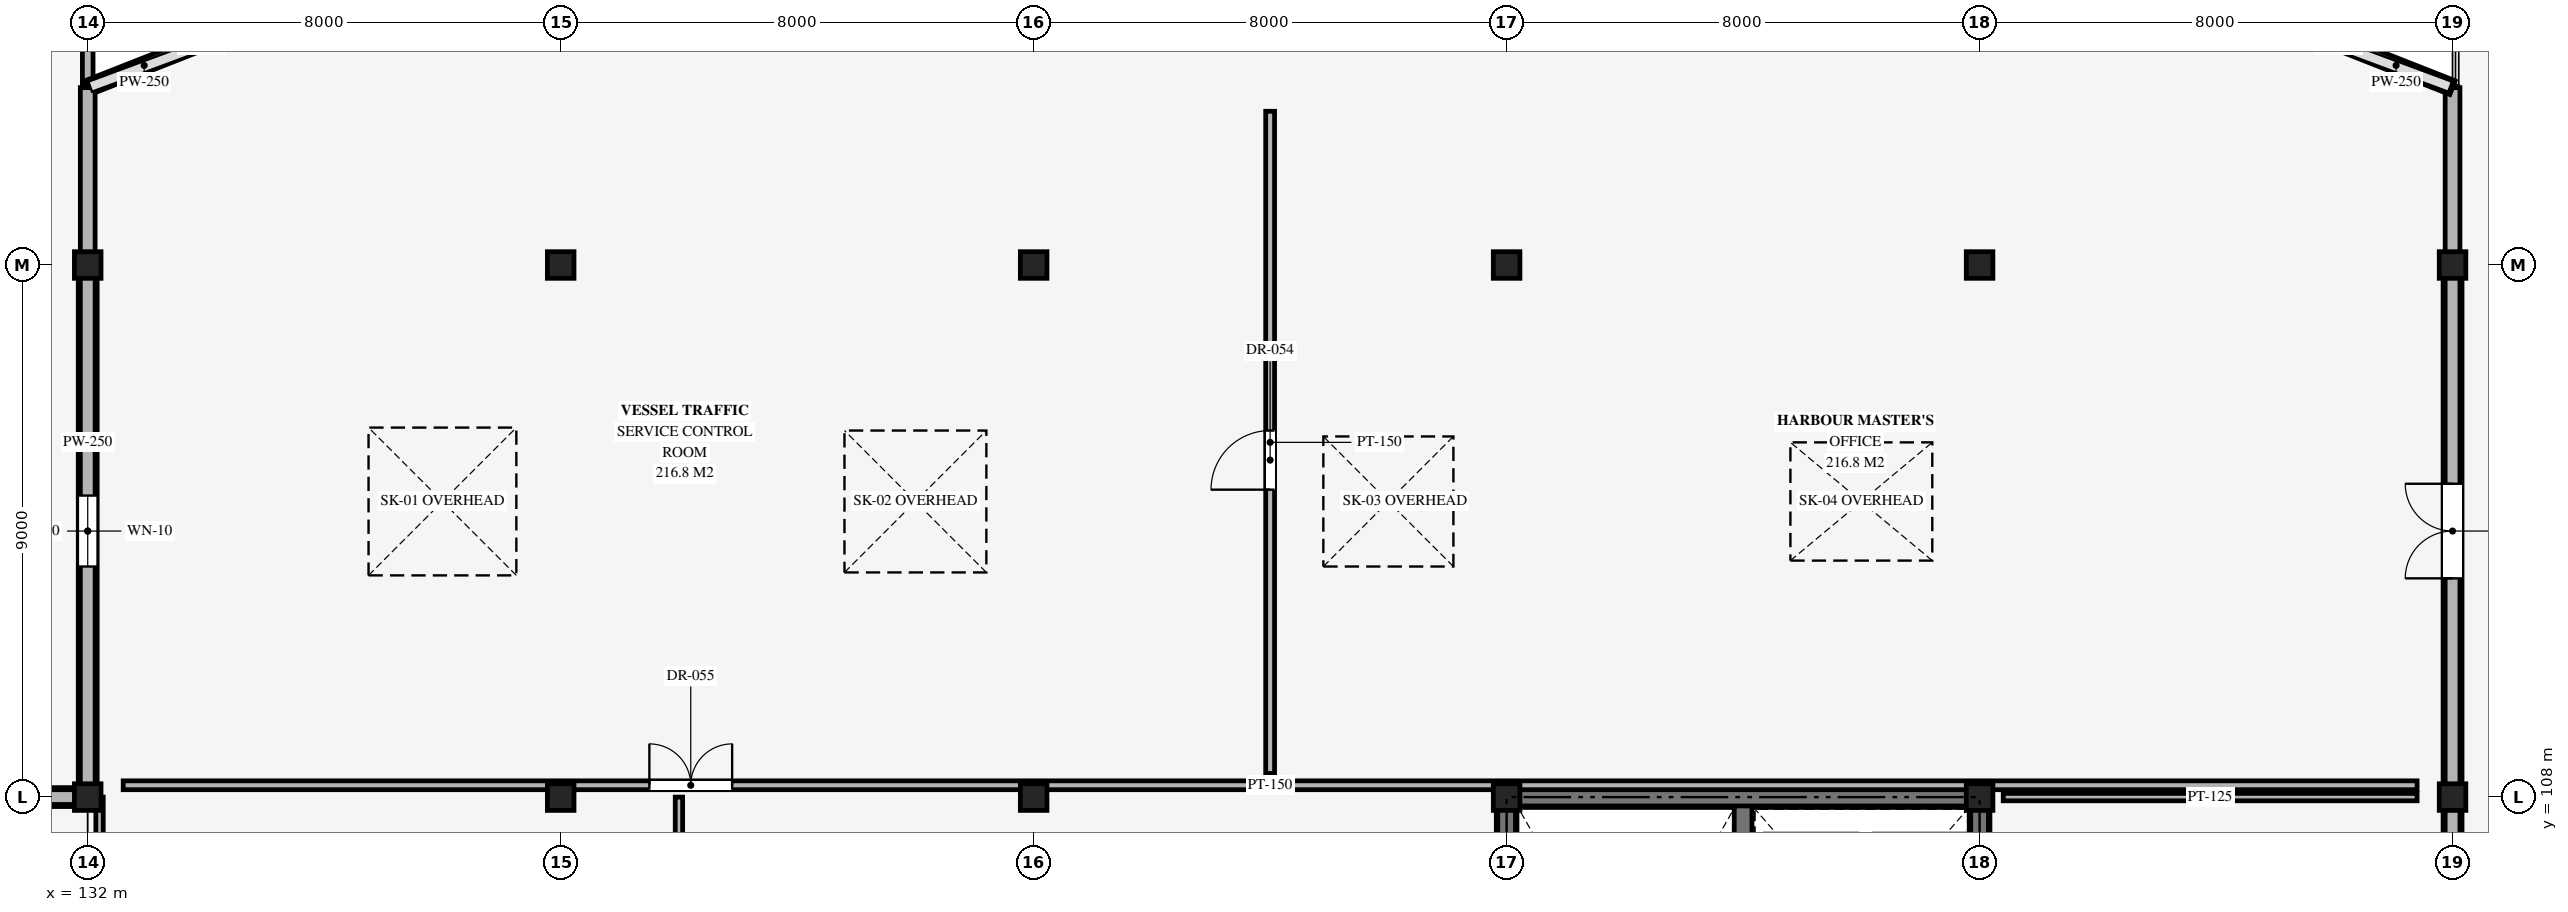
"""IFC4 building model, lengths in metres.
Left out: names, types, materials, properties, quantities, classifications, styles, units other than length and angle.
Written with IfcOpenShell. Run it as: python <this file> out.ifc"""

import sys

from ifc_helpers import new_model, si_unit, direction, frame, frame_2d, origin, origin_2d, place, context, subcontext, project, spatial, rectangle, extrude, element, fill, save


model = new_model("IFC4")
c1 = context("Model", 3, precision=1e-05, world=origin(), true_north=direction((0.0, 1.0)))
c2 = subcontext(c1, "Body", "Model", "MODEL_VIEW")
j1 = project(units=[si_unit("LENGTHUNIT", "METRE"), si_unit("PLANEANGLEUNIT", "RADIAN")], contexts=[c1])
p1 = place(None, origin())
s1 = spatial("IfcSite", under=j1, at=p1, CompositionType="ELEMENT")
p2 = place(p1, origin())
s2 = spatial("IfcBuilding", under=s1, at=p2, CompositionType="ELEMENT")
p3 = place(p2, frame((0.0, 0.0, 23.7)))
s3 = spatial("IfcBuildingStorey", under=s2, at=p3, CompositionType="ELEMENT", Elevation=23.7)
for number, where, z_axis, x_axis in (
    (1, (132.0, 108.0, 0.0), (0.0, 0.0, 1.0), (1.0, 0.0, 0.0)),
    (2, (132.0, 117.0, 0.0), (0.0, 0.0, 1.0), (1.0, 0.0, 0.0)),
    (3, (140.0, 108.0, 0.0), (0.0, 0.0, 1.0), (1.0, 0.0, 0.0)),
    (4, (140.0, 117.0, 0.0), (0.0, 0.0, 1.0), (1.0, 0.0, 0.0)),
    (5, (148.0, 108.0, 0.0), (0.0, 0.0, 1.0), (1.0, 0.0, 0.0)),
    (6, (148.0, 117.0, 0.0), (0.0, 0.0, 1.0), (1.0, 0.0, 0.0)),
    (7, (156.0, 108.0, 0.0), (0.0, 0.0, 1.0), (1.0, 0.0, 0.0)),
    (8, (156.0, 117.0, 0.0), (0.0, 0.0, 1.0), (1.0, 0.0, 0.0)),
    (9, (164.0, 108.0, 0.0), (0.0, 0.0, 1.0), (1.0, 0.0, 0.0)),
    (10, (164.0, 117.0, 0.0), (0.0, 0.0, 1.0), (1.0, 0.0, 0.0)),
    (11, (172.0, 108.0, 0.0), (0.0, 0.0, 1.0), (1.0, 0.0, 0.0)),
    (12, (172.0, 117.0, 0.0), (0.0, 0.0, 1.0), (1.0, 0.0, 0.0)),
):
    element("IfcColumn", number, at=place(p3, frame(where, z_axis=z_axis, x_axis=x_axis)), inside=s3, PredefinedType="COLUMN", context=c2, shape_type="SweptSolid", body=[
        extrude(rectangle(XDim=0.45, YDim=0.45, at=origin_2d()), origin(), (0.0, 0.0, 1.0), 4.04),
    ])
p4 = place(p3, frame((172.0, 99.225, 0.0), z_axis=(0.0, 0.0, 1.0), x_axis=(0.0, 1.0, 0.0)))
e13 = element("IfcWall", 13, at=p4, inside=s3, PredefinedType="SOLIDWALL", context=c2, shape_type="SweptSolid", body=[
    extrude(rectangle(XDim=8.55, YDim=0.32, at=frame_2d((4.275, 0.0))), origin(), (0.0, 0.0, 1.0), 3.98),
])
p5 = place(p4, frame((3.475, 0.0, 0.0)))
e14 = element("IfcOpeningElement", 14, at=p5, cuts=e13, PredefinedType="OPENING", context=c2, shape_type="SweptSolid", body=[
    extrude(rectangle(XDim=1.6, YDim=2.2, at=frame_2d((0.8, 1.1))), frame((0.0, 0.17, 0.0), z_axis=(0.0, -1.0, 0.0), x_axis=(1.0, 0.0, 0.0)), (0.0, 0.0, 1.0), 0.34),
])
p6 = place(p3, frame((172.0, 108.225, 0.0), z_axis=(0.0, 0.0, 1.0), x_axis=(0.0, 1.0, 0.0)))
e15 = element("IfcWall", 15, at=p6, inside=s3, PredefinedType="SOLIDWALL", context=c2, shape_type="SweptSolid", body=[
    extrude(rectangle(XDim=8.55, YDim=0.32, at=frame_2d((4.275, 0.0))), origin(), (0.0, 0.0, 1.0), 3.98),
])
p7 = place(p6, frame((3.475, 0.0, 0.0)))
e16 = element("IfcOpeningElement", 16, at=p7, cuts=e15, PredefinedType="OPENING", context=c2, shape_type="SweptSolid", body=[
    extrude(rectangle(XDim=1.6, YDim=2.2, at=frame_2d((0.8, 1.1))), frame((0.0, 0.17, 0.0), z_axis=(0.0, -1.0, 0.0), x_axis=(1.0, 0.0, 0.0)), (0.0, 0.0, 1.0), 0.34),
])
p8 = place(p3, frame((132.0, 116.775, 0.0), z_axis=(0.0, 0.0, 1.0), x_axis=(0.0, -1.0, 0.0)))
e17 = element("IfcWall", 17, at=p8, inside=s3, PredefinedType="SOLIDWALL", context=c2, shape_type="SweptSolid", body=[
    extrude(rectangle(XDim=8.55, YDim=0.32, at=frame_2d((4.275, 0.0))), origin(), (0.0, 0.0, 1.0), 3.98),
])
p9 = place(p8, frame((3.675, 0.0, 1.0)))
e18 = element("IfcOpeningElement", 18, at=p9, cuts=e17, PredefinedType="OPENING", context=c2, shape_type="SweptSolid", body=[
    extrude(rectangle(XDim=1.2, YDim=1.8, at=frame_2d((0.6, 0.9))), frame((0.0, 0.17, 0.0), z_axis=(0.0, -1.0, 0.0), x_axis=(1.0, 0.0, 0.0)), (0.0, 0.0, 1.0), 0.34),
])
p10 = place(p3, frame((120.225, 108.0, 0.0), z_axis=(0.0, 0.0, 1.0), x_axis=(1.0, 0.0, 0.0)))
e19 = element("IfcWall", 19, at=p10, inside=s3, PredefinedType="SOLIDWALL", context=c2, shape_type="SweptSolid", body=[
    extrude(rectangle(XDim=11.55, YDim=0.32, at=frame_2d((5.775, 0.0))), origin(), (0.0, 0.0, 1.0), 3.98),
])
p11 = place(p3, frame((132.0, 126.0, 0.0), z_axis=(0.0, 0.0, 1.0), x_axis=(0.0, -1.0, 0.0)))
e20 = element("IfcWall", 20, at=p11, inside=s3, PredefinedType="PARAPET", context=c2, shape_type="SweptSolid", body=[
    extrude(rectangle(XDim=6.0, YDim=0.18, at=frame_2d((3.0, 0.0))), origin(), (0.0, 0.0, 1.0), 1.15),
])
p12 = place(p3, frame((172.0, 90.0, 4.2), z_axis=(0.0, 0.0, 1.0), x_axis=(0.0, 1.0, 0.0)))
e21 = element("IfcWall", 21, at=p12, inside=s3, PredefinedType="PARAPET", context=c2, shape_type="SweptSolid", body=[
    extrude(rectangle(XDim=30.0, YDim=0.25, at=frame_2d((15.0, 0.0))), origin(), (0.0, 0.0, 1.0), 1.35),
])
for number, where, z_axis, x_axis in (
    (22, (172.0, 120.0, 4.2), (0.0, 0.0, 1.0), (-0.93, 0.366, 0.0)),
    (23, (133.91, 120.752, 4.2), (0.0, 0.0, 1.0), (-0.93, -0.366, 0.0)),
):
    element("IfcWall", number, at=place(p3, frame(where, z_axis=z_axis, x_axis=x_axis)), inside=s3, PredefinedType="PARAPET", context=c2, shape_type="SweptSolid", body=[
        extrude(rectangle(XDim=2.052, YDim=0.25, at=frame_2d((1.026, 0.0))), origin(), (0.0, 0.0, 1.0), 1.35),
    ])
p13 = place(p3, frame((132.0, 120.0, 4.2), z_axis=(0.0, 0.0, 1.0), x_axis=(0.0, -1.0, 0.0)))
e24 = element("IfcWall", 24, at=p13, inside=s3, PredefinedType="PARAPET", context=c2, shape_type="SweptSolid", body=[
    extrude(rectangle(XDim=12.0, YDim=0.25, at=frame_2d((6.0, 0.0))), origin(), (0.0, 0.0, 1.0), 1.35),
])
p14 = place(p3, frame((132.0, 108.0, 4.2), z_axis=(0.0, 0.0, 1.0), x_axis=(-1.0, 0.0, 0.0)))
e25 = element("IfcWall", 25, at=p14, inside=s3, PredefinedType="PARAPET", context=c2, shape_type="SweptSolid", body=[
    extrude(rectangle(XDim=24.0, YDim=0.25, at=frame_2d((12.0, 0.0))), origin(), (0.0, 0.0, 1.0), 1.35),
])
p15 = place(p3, frame((156.0, 108.0, 0.0), z_axis=(0.0, 0.0, 1.0), x_axis=(1.0, 0.0, 0.0)))
e26 = element("IfcWall", 26, at=p15, inside=s3, PredefinedType="SHEAR", context=c2, shape_type="SweptSolid", body=[
    extrude(rectangle(XDim=8.0, YDim=0.35, at=frame_2d((4.0, 0.0))), origin(), (0.0, 0.0, 1.0), 3.98),
])
p16 = place(p3, frame((156.0, 99.0, 0.0), z_axis=(0.0, 0.0, 1.0), x_axis=(0.0, 1.0, 0.0)))
e27 = element("IfcWall", 27, at=p16, inside=s3, PredefinedType="SHEAR", context=c2, shape_type="SweptSolid", body=[
    extrude(rectangle(XDim=9.0, YDim=0.35, at=frame_2d((4.5, 0.0))), origin(), (0.0, 0.0, 1.0), 3.98),
])
p17 = place(p3, frame((164.0, 99.0, 0.0), z_axis=(0.0, 0.0, 1.0), x_axis=(0.0, 1.0, 0.0)))
e28 = element("IfcWall", 28, at=p17, inside=s3, PredefinedType="SHEAR", context=c2, shape_type="SweptSolid", body=[
    extrude(rectangle(XDim=9.0, YDim=0.35, at=frame_2d((4.5, 0.0))), origin(), (0.0, 0.0, 1.0), 3.98),
])
p18 = place(p17, frame((1.4, 0.0, 0.0)))
e29 = element("IfcOpeningElement", 29, at=p18, cuts=e28, PredefinedType="OPENING", context=c2, shape_type="SweptSolid", body=[
    extrude(rectangle(XDim=1.5, YDim=2.2, at=frame_2d((0.75, 1.1))), frame((0.0, 0.185, 0.0), z_axis=(0.0, -1.0, 0.0), x_axis=(1.0, 0.0, 0.0)), (0.0, 0.0, 1.0), 0.37),
])
p19 = place(p3, frame((160.0, 108.0, 0.0), z_axis=(0.0, 0.0, 1.0), x_axis=(0.0, -1.0, 0.0)))
e30 = element("IfcWall", 30, at=p19, inside=s3, PredefinedType="SHEAR", context=c2, shape_type="SweptSolid", body=[
    extrude(rectangle(XDim=9.0, YDim=0.3, at=frame_2d((4.5, 0.0))), origin(), (0.0, 0.0, 1.0), 3.98),
])
p20 = place(p19, frame((7.45, 0.0, 0.0)))
e31 = element("IfcOpeningElement", 31, at=p20, cuts=e30, PredefinedType="OPENING", context=c2, shape_type="SweptSolid", body=[
    extrude(rectangle(XDim=1.05, YDim=2.15, at=frame_2d((0.525, 1.075))), frame((0.0, 0.16, 0.0), z_axis=(0.0, -1.0, 0.0), x_axis=(1.0, 0.0, 0.0)), (0.0, 0.0, 1.0), 0.32),
])
p21 = place(p3, frame((156.0, 108.0, 3.98), z_axis=(0.0, 0.0, 1.0), x_axis=(1.0, 0.0, 0.0)))
e32 = element("IfcWall", 32, at=p21, inside=s3, PredefinedType="SHEAR", context=c2, shape_type="SweptSolid", body=[
    extrude(rectangle(XDim=8.0, YDim=0.3, at=frame_2d((4.0, 0.0))), origin(), (0.0, 0.0, 1.0), 1.84),
])
for number, where, z_axis, x_axis in (
    (33, (156.0, 99.0, 3.98), (0.0, 0.0, 1.0), (0.0, 1.0, 0.0)),
    (34, (164.0, 99.0, 3.98), (0.0, 0.0, 1.0), (0.0, 1.0, 0.0)),
):
    element("IfcWall", number, at=place(p3, frame(where, z_axis=z_axis, x_axis=x_axis)), inside=s3, PredefinedType="SHEAR", context=c2, shape_type="SweptSolid", body=[
        extrude(rectangle(XDim=9.0, YDim=0.3, at=frame_2d((4.5, 0.0))), origin(), (0.0, 0.0, 1.0), 1.84),
    ])
p22 = place(p3, frame((152.0, 108.4, 0.0), z_axis=(0.0, 0.0, 1.0), x_axis=(0.0, 1.0, 0.0)))
e35 = element("IfcWall", 35, at=p22, inside=s3, PredefinedType="PARTITIONING", context=c2, shape_type="SweptSolid", body=[
    extrude(rectangle(XDim=11.2, YDim=0.15, at=frame_2d((5.6, 0.0))), origin(), (0.0, 0.0, 1.0), 3.25),
])
p23 = place(p22, frame((4.8, 0.0, 0.0)))
e36 = element("IfcOpeningElement", 36, at=p23, cuts=e35, PredefinedType="OPENING", context=c2, shape_type="SweptSolid", body=[
    extrude(rectangle(XDim=1.0, YDim=2.15, at=frame_2d((0.5, 1.075))), frame((0.0, 0.085, 0.0), z_axis=(0.0, -1.0, 0.0), x_axis=(1.0, 0.0, 0.0)), (0.0, 0.0, 1.0), 0.17),
])
p24 = place(p3, frame((132.6, 108.2, 0.0), z_axis=(0.0, 0.0, 1.0), x_axis=(1.0, 0.0, 0.0)))
e37 = element("IfcWall", 37, at=p24, inside=s3, PredefinedType="PARTITIONING", context=c2, shape_type="SweptSolid", body=[
    extrude(rectangle(XDim=38.8, YDim=0.15, at=frame_2d((19.4, 0.0))), origin(), (0.0, 0.0, 1.0), 3.25),
])
p25 = place(p24, frame((8.9, 0.0, 0.0)))
e38 = element("IfcOpeningElement", 38, at=p25, cuts=e37, PredefinedType="OPENING", context=c2, shape_type="SweptSolid", body=[
    extrude(rectangle(XDim=1.4, YDim=2.15, at=frame_2d((0.7, 1.075))), frame((0.0, 0.085, 0.0), z_axis=(0.0, -1.0, 0.0), x_axis=(1.0, 0.0, 0.0)), (0.0, 0.0, 1.0), 0.17),
])
p26 = place(p3, frame((142.0, 99.4, 0.0), z_axis=(0.0, 0.0, 1.0), x_axis=(0.0, 1.0, 0.0)))
e39 = element("IfcWall", 39, at=p26, inside=s3, PredefinedType="PARTITIONING", context=c2, shape_type="SweptSolid", body=[
    extrude(rectangle(XDim=8.6, YDim=0.125, at=frame_2d((4.3, 0.0))), origin(), (0.0, 0.0, 1.0), 3.25),
])
p27 = place(p26, frame((3.6, 0.0, 0.0)))
e40 = element("IfcOpeningElement", 40, at=p27, cuts=e39, PredefinedType="OPENING", context=c2, shape_type="SweptSolid", body=[
    extrude(rectangle(XDim=0.95, YDim=2.1, at=frame_2d((0.475, 1.05))), frame((0.0, 0.073, 0.0), z_axis=(0.0, -1.0, 0.0), x_axis=(1.0, 0.0, 0.0)), (0.0, 0.0, 1.0), 0.145),
])
p28 = place(p3, frame((132.2, 99.4, 0.0), z_axis=(0.0, 0.0, 1.0), x_axis=(0.0, 1.0, 0.0)))
e41 = element("IfcWall", 41, at=p28, inside=s3, PredefinedType="PARTITIONING", context=c2, shape_type="SweptSolid", body=[
    extrude(rectangle(XDim=8.6, YDim=0.125, at=frame_2d((4.3, 0.0))), origin(), (0.0, 0.0, 1.0), 3.25),
])
p29 = place(p28, frame((3.6, 0.0, 0.0)))
e42 = element("IfcOpeningElement", 42, at=p29, cuts=e41, PredefinedType="OPENING", context=c2, shape_type="SweptSolid", body=[
    extrude(rectangle(XDim=1.05, YDim=2.15, at=frame_2d((0.525, 1.075))), frame((0.0, 0.073, 0.0), z_axis=(0.0, -1.0, 0.0), x_axis=(1.0, 0.0, 0.0)), (0.0, 0.0, 1.0), 0.145),
])
p30 = place(p3, frame((164.4, 108.0, 0.0), z_axis=(0.0, 0.0, 1.0), x_axis=(1.0, 0.0, 0.0)))
e43 = element("IfcWall", 43, at=p30, inside=s3, PredefinedType="PARTITIONING", context=c2, shape_type="SweptSolid", body=[
    extrude(rectangle(XDim=7.0, YDim=0.125, at=frame_2d((3.5, 0.0))), origin(), (0.0, 0.0, 1.0), 3.25),
])
p31 = place(p7, origin())
e44 = element("IfcDoor", 44, at=p31, inside=s3, OperationType="DOUBLE_DOOR_SINGLE_SWING", PredefinedType="DOOR", context=c2, shape_type="SweptSolid", body=[
    extrude(rectangle(XDim=1.6, YDim=2.2, at=frame_2d((0.8, 1.1))), frame((0.0, 0.025, 0.0), z_axis=(0.0, -1.0, 0.0), x_axis=(1.0, 0.0, 0.0)), (0.0, 0.0, 1.0), 0.05),
])
fill(e16, e44)
p32 = place(p9, origin())
e45 = element("IfcWindow", 45, at=p32, inside=s3, PartitioningType="SINGLE_PANEL", PredefinedType="WINDOW", context=c2, shape_type="SweptSolid", body=[
    extrude(rectangle(XDim=1.2, YDim=1.8, at=frame_2d((0.6, 0.9))), frame((0.0, 0.03, 0.0), z_axis=(0.0, -1.0, 0.0), x_axis=(1.0, 0.0, 0.0)), (0.0, 0.0, 1.0), 0.06),
])
fill(e18, e45)
p33 = place(p2, frame((0.0, 0.0, 27.9)))
p34 = place(p33, frame((0.0, 0.0, -0.22)))
p35 = place(p34, frame((138.0, 113.0, 0.0)))
p36 = place(p35, frame((0.0, 0.0, 0.17)))
e46 = element("IfcWindow", 46, at=p36, inside=s3, PartitioningType="SINGLE_PANEL", PredefinedType="SKYLIGHT", context=c2, shape_type="SweptSolid", body=[
    extrude(rectangle(XDim=2.5, YDim=2.5, at=origin_2d()), origin(), (0.0, 0.0, 1.0), 0.05),
])
p37 = place(p34, frame((146.0, 113.0, 0.0)))
p38 = place(p37, frame((0.0, 0.0, 0.17)))
e47 = element("IfcWindow", 47, at=p38, inside=s3, PartitioningType="SINGLE_PANEL", PredefinedType="SKYLIGHT", context=c2, shape_type="SweptSolid", body=[
    extrude(rectangle(XDim=2.4, YDim=2.4, at=origin_2d()), origin(), (0.0, 0.0, 1.0), 0.05),
])
p39 = place(p34, frame((154.0, 113.0, 0.0)))
p40 = place(p39, frame((0.0, 0.0, 0.17)))
e48 = element("IfcWindow", 48, at=p40, inside=s3, PartitioningType="SINGLE_PANEL", PredefinedType="SKYLIGHT", context=c2, shape_type="SweptSolid", body=[
    extrude(rectangle(XDim=2.2, YDim=2.2, at=origin_2d()), origin(), (0.0, 0.0, 1.0), 0.05),
])
p41 = place(p34, frame((162.0, 113.0, 0.0)))
p42 = place(p41, frame((0.0, 0.0, 0.17)))
e49 = element("IfcWindow", 49, at=p42, inside=s3, PartitioningType="SINGLE_PANEL", PredefinedType="SKYLIGHT", context=c2, shape_type="SweptSolid", body=[
    extrude(rectangle(XDim=2.4, YDim=2.0, at=origin_2d()), origin(), (0.0, 0.0, 1.0), 0.05),
])
p43 = place(p23, origin())
e50 = element("IfcDoor", 50, at=p43, inside=s3, OperationType="SINGLE_SWING_LEFT", PredefinedType="DOOR", context=c2, shape_type="SweptSolid", body=[
    extrude(rectangle(XDim=1.0, YDim=2.15, at=frame_2d((0.5, 1.075))), frame((0.0, 0.025, 0.0), z_axis=(0.0, -1.0, 0.0), x_axis=(1.0, 0.0, 0.0)), (0.0, 0.0, 1.0), 0.05),
])
fill(e36, e50)
p44 = place(p25, origin())
e51 = element("IfcDoor", 51, at=p44, inside=s3, OperationType="DOUBLE_DOOR_SINGLE_SWING", PredefinedType="DOOR", context=c2, shape_type="SweptSolid", body=[
    extrude(rectangle(XDim=1.4, YDim=2.15, at=frame_2d((0.7, 1.075))), frame((0.0, 0.025, 0.0), z_axis=(0.0, -1.0, 0.0), x_axis=(1.0, 0.0, 0.0)), (0.0, 0.0, 1.0), 0.05),
])
fill(e38, e51)
save(model, sys.argv[1])
